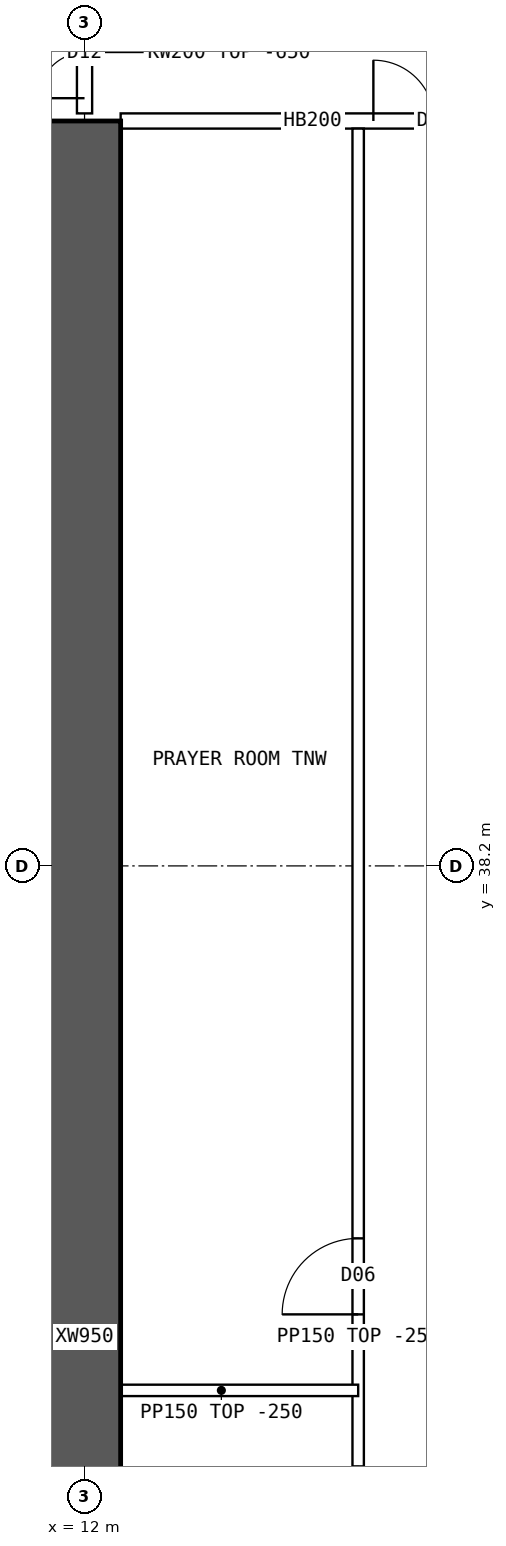
"""IFC4 building model, lengths in metres.
Left out: names, types, materials, properties, quantities, classifications, styles, units other than length and angle.
Written with IfcOpenShell. Run it as: python <this file> out.ifc"""

import sys

from ifc_helpers import new_model, si_unit, direction, frame, frame_2d, origin, place, context, subcontext, project, spatial, polyline, rectangle, outline, extrude, element, fill, save


model = new_model("IFC4")
c1 = context("Model", 3, precision=1e-05, world=origin(), true_north=direction((0.0, 1.0)))
c2 = subcontext(c1, "Body", "Model", "MODEL_VIEW")
j1 = project(units=[si_unit("LENGTHUNIT", "METRE"), si_unit("PLANEANGLEUNIT", "RADIAN")], contexts=[c1])
p1 = place(None, origin())
s1 = spatial("IfcSite", under=j1, at=p1, CompositionType="ELEMENT")
p2 = place(p1, origin())
s2 = spatial("IfcBuilding", under=s1, at=p2, CompositionType="ELEMENT")
p3 = place(p2, frame((0.0, 0.0, 76.15)))
s3 = spatial("IfcBuildingStorey", under=s2, at=p3, CompositionType="ELEMENT", Elevation=76.15)
p4 = place(p3, frame((12.0, 16.0, 0.0), z_axis=(0.0, 0.0, 1.0), x_axis=(0.0, 1.0, 0.0)))
e1 = element("IfcWall", 1, at=p4, inside=s3, PredefinedType="SHEAR", context=c2, shape_type="SweptSolid", body=[
    extrude(rectangle(XDim=32.0, YDim=0.95, at=frame_2d((16.0, 0.0))), origin(), (0.0, 0.0, 1.0), 4.5),
])
p5 = place(p3, frame((12.475, 48.0, 0.0), z_axis=(0.0, 0.0, 1.0), x_axis=(1.0, 0.0, 0.0)))
e2 = element("IfcWall", 2, at=p5, inside=s3, PredefinedType="SOLIDWALL", context=c2, shape_type="SweptSolid", body=[
    extrude(rectangle(XDim=5.05, YDim=0.2, at=frame_2d((2.525, 0.0))), origin(), (0.0, 0.0, 1.0), 4.25),
])
p6 = place(p5, frame((3.325, 0.0, 0.0)))
e3 = element("IfcOpeningElement", 3, at=p6, cuts=e2, PredefinedType="OPENING", context=c2, shape_type="SweptSolid", body=[
    extrude(rectangle(XDim=1.6, YDim=2.1, at=frame_2d((0.8, 1.05))), frame((0.0, 0.11, 0.0), z_axis=(0.0, -1.0, 0.0), x_axis=(1.0, 0.0, 0.0)), (0.0, 0.0, 1.0), 0.22),
])
p7 = place(p3, frame((15.6, 16.1, 0.0), z_axis=(0.0, 0.0, 1.0), x_axis=(0.0, 1.0, 0.0)))
e4 = element("IfcWall", 4, at=p7, inside=s3, PredefinedType="PARTITIONING", context=c2, shape_type="SweptSolid", body=[
    extrude(rectangle(XDim=31.8, YDim=0.15, at=frame_2d((15.9, 0.0))), origin(), (0.0, 0.0, 1.0), 4.25),
])
p8 = place(p7, frame((13.2, 0.0, 0.0)))
e5 = element("IfcOpeningElement", 5, at=p8, cuts=e4, PredefinedType="OPENING", context=c2, shape_type="SweptSolid", body=[
    extrude(rectangle(XDim=1.0, YDim=2.1, at=frame_2d((0.5, 1.05))), frame((0.0, 0.085, 0.0), z_axis=(0.0, -1.0, 0.0), x_axis=(1.0, 0.0, 0.0)), (0.0, 0.0, 1.0), 0.17),
])
p9 = place(p7, frame((16.2, 0.0, 0.0)))
e6 = element("IfcOpeningElement", 6, at=p9, cuts=e4, PredefinedType="OPENING", context=c2, shape_type="SweptSolid", body=[
    extrude(rectangle(XDim=1.0, YDim=2.1, at=frame_2d((0.5, 1.05))), frame((0.0, 0.085, 0.0), z_axis=(0.0, -1.0, 0.0), x_axis=(1.0, 0.0, 0.0)), (0.0, 0.0, 1.0), 0.17),
])
p10 = place(p3, frame((12.0, 31.3, 0.0), z_axis=(0.0, 0.0, 1.0), x_axis=(1.0, 0.0, 0.0)))
e7 = element("IfcWall", 7, at=p10, inside=s3, PredefinedType="PARTITIONING", context=c2, shape_type="SweptSolid", body=[
    extrude(rectangle(XDim=3.6, YDim=0.15, at=frame_2d((1.8, 0.0))), origin(), (0.0, 0.0, 1.0), 4.25),
])
p11 = place(p3, frame((3.905, 30.85, 0.0), z_axis=(0.0, 0.0, 1.0), x_axis=(1.0, 0.0, 0.0)))
e8 = element("IfcWall", 8, at=p11, inside=s3, PredefinedType="PARTITIONING", context=c2, shape_type="SweptSolid", body=[
    extrude(outline(polyline([(0.0, 0.0), (8.02, 0.0), (8.02, 4.25), (2.397, 4.25), (2.395, 3.8), (1.797, 3.8), (1.795, 4.25), (0.0, 4.25), (0.0, 0.0)])), frame((0.0, 0.075, 0.0), z_axis=(0.0, -1.0, 0.0), x_axis=(1.0, 0.0, 0.0)), (0.0, 0.0, 1.0), 0.15),
])
p12 = place(p3, frame((12.0, 48.1, 0.0), z_axis=(0.0, 0.0, 1.0), x_axis=(0.0, 1.0, 0.0)))
e9 = element("IfcWall", 9, at=p12, inside=s3, PredefinedType="SOLIDWALL", context=c2, shape_type="SweptSolid", body=[
    extrude(outline(polyline([(0.0, 0.0), (1.6, 0.0), (1.6, 3.85), (0.0, 3.85), (0.0, 0.0)])), frame((0.0, 0.1, 0.0), z_axis=(0.0, -1.0, 0.0), x_axis=(1.0, 0.0, 0.0)), (0.0, 0.0, 1.0), 0.2),
])
p13 = place(p12, frame((0.2, 0.0, 0.0)))
e10 = element("IfcOpeningElement", 10, at=p13, cuts=e9, PredefinedType="OPENING", context=c2, shape_type="SweptSolid", body=[
    extrude(rectangle(XDim=1.2, YDim=2.1, at=frame_2d((0.6, 1.05))), frame((0.0, 0.11, 0.0), z_axis=(0.0, -1.0, 0.0), x_axis=(1.0, 0.0, 0.0)), (0.0, 0.0, 1.0), 0.22),
])
p14 = place(p6, origin())
e11 = element("IfcDoor", 11, at=p14, inside=s3, OperationType="DOUBLE_DOOR_SINGLE_SWING", PredefinedType="DOOR", context=c2, shape_type="SweptSolid", body=[
    extrude(rectangle(XDim=1.6, YDim=2.1, at=frame_2d((0.8, 1.05))), frame((0.0, 0.025, 0.0), z_axis=(0.0, -1.0, 0.0), x_axis=(1.0, 0.0, 0.0)), (0.0, 0.0, 1.0), 0.05),
])
fill(e3, e11)
p15 = place(p9, origin())
e12 = element("IfcDoor", 12, at=p15, inside=s3, OperationType="SINGLE_SWING_LEFT", PredefinedType="DOOR", context=c2, shape_type="SweptSolid", body=[
    extrude(rectangle(XDim=1.0, YDim=2.1, at=frame_2d((0.5, 1.05))), frame((0.0, 0.025, 0.0), z_axis=(0.0, -1.0, 0.0), x_axis=(1.0, 0.0, 0.0)), (0.0, 0.0, 1.0), 0.05),
])
fill(e6, e12)
p16 = place(p13, origin())
e13 = element("IfcDoor", 13, at=p16, inside=s3, OperationType="DOUBLE_DOOR_SINGLE_SWING", PredefinedType="DOOR", context=c2, shape_type="SweptSolid", body=[
    extrude(rectangle(XDim=1.2, YDim=2.1, at=frame_2d((0.6, 1.05))), frame((0.0, 0.025, 0.0), z_axis=(0.0, -1.0, 0.0), x_axis=(1.0, 0.0, 0.0)), (0.0, 0.0, 1.0), 0.05),
])
fill(e10, e13)
save(model, sys.argv[1])
